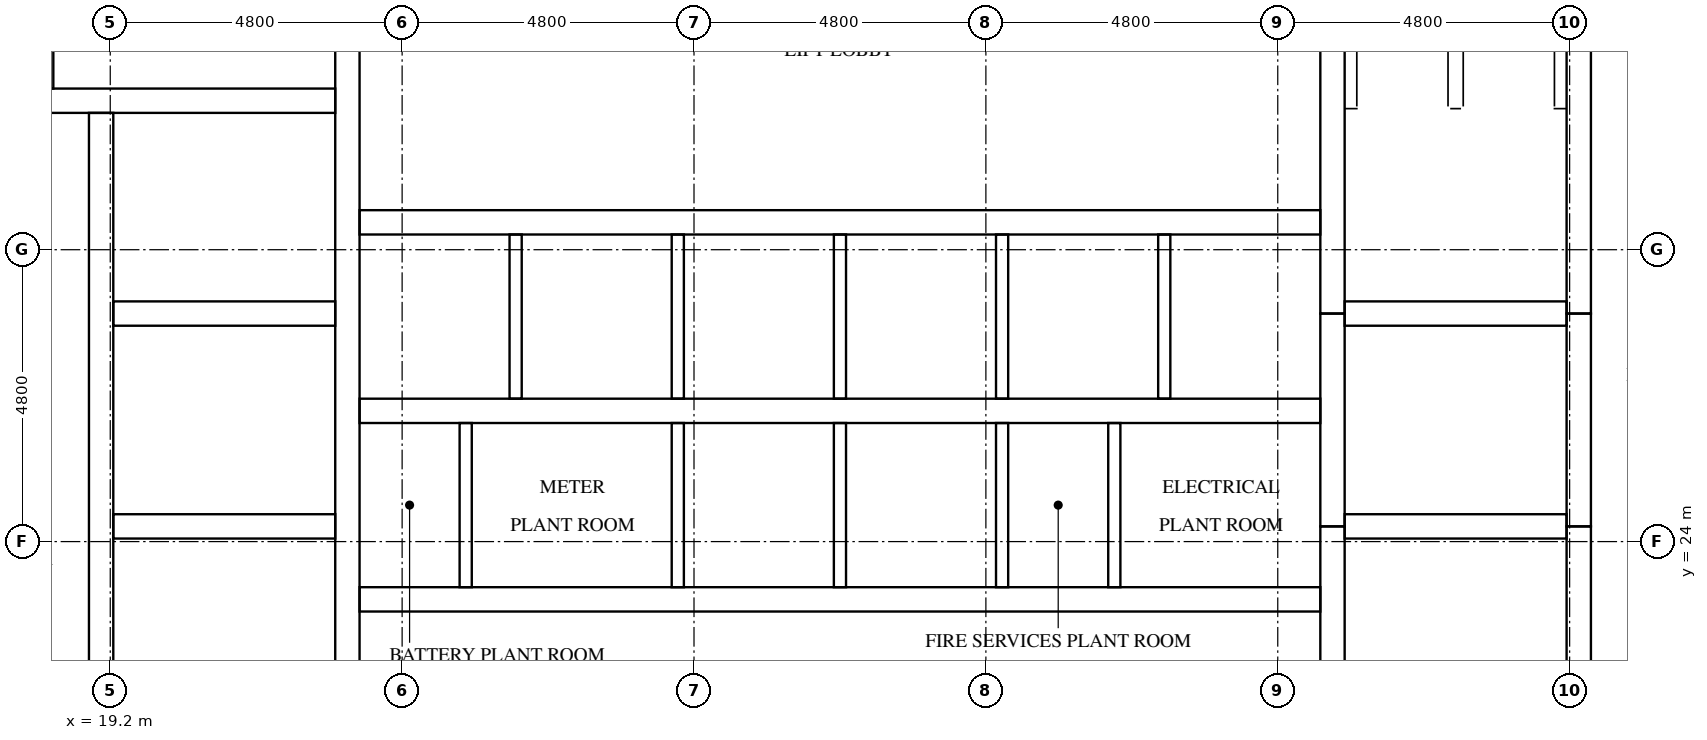
"""IFC4 building model, lengths in metres.
Left out: names, types, materials, properties, quantities, classifications, styles, units other than length and angle.
Written with IfcOpenShell. Run it as: python <this file> out.ifc"""

import sys

from ifc_helpers import new_model, si_unit, direction, frame, frame_2d, origin, place, context, subcontext, project, spatial, rectangle, extrude, element, fill, save


model = new_model("IFC4")
c1 = context("Model", 3, precision=1e-05, world=origin(), true_north=direction((0.0, 1.0)))
c2 = subcontext(c1, "Body", "Model", "MODEL_VIEW")
j1 = project(units=[si_unit("LENGTHUNIT", "METRE"), si_unit("PLANEANGLEUNIT", "RADIAN")], contexts=[c1])
p1 = place(None, origin())
s1 = spatial("IfcSite", under=j1, at=p1, CompositionType="ELEMENT")
p2 = place(p1, origin())
s2 = spatial("IfcBuilding", under=s1, at=p2, CompositionType="ELEMENT")
p3 = place(p2, frame((0.0, 0.0, 291.5)))
s3 = spatial("IfcBuildingStorey", under=s2, at=p3, CompositionType="ELEMENT", Elevation=291.5)
p4 = place(p3, frame((19.05, 15.5, 0.0), z_axis=(0.0, 0.0, 1.0), x_axis=(0.0, 1.0, 0.0)))
e1 = element("IfcWall", 1, at=p4, inside=s3, PredefinedType="SHEAR", context=c2, shape_type="SweptSolid", body=[
    extrude(rectangle(XDim=15.55, YDim=0.4, at=frame_2d((7.775, 0.0))), origin(), (0.0, 0.0, 1.0), 4.4),
])
p5 = place(p4, frame((9.95, 0.0, 0.0)))
e2 = element("IfcOpeningElement", 2, at=p5, cuts=e1, PredefinedType="OPENING", context=c2, shape_type="SweptSolid", body=[
    extrude(rectangle(XDim=1.1, YDim=2.1, at=frame_2d((0.55, 1.05))), frame((0.0, 0.21, 0.0), z_axis=(0.0, -1.0, 0.0), x_axis=(1.0, 0.0, 0.0)), (0.0, 0.0, 1.0), 0.42),
])
p6 = place(p4, frame((13.45, 0.0, 0.0)))
e3 = element("IfcOpeningElement", 3, at=p6, cuts=e1, PredefinedType="OPENING", context=c2, shape_type="SweptSolid", body=[
    extrude(rectangle(XDim=1.1, YDim=2.1, at=frame_2d((0.55, 1.05))), frame((0.0, 0.21, 0.0), z_axis=(0.0, -1.0, 0.0), x_axis=(1.0, 0.0, 0.0)), (0.0, 0.0, 1.0), 0.42),
])
p7 = place(p4, frame((0.7, 0.0, 0.0)))
e4 = element("IfcOpeningElement", 4, at=p7, cuts=e1, PredefinedType="OPENING", context=c2, shape_type="SweptSolid", body=[
    extrude(rectangle(XDim=1.2, YDim=2.1, at=frame_2d((0.6, 1.05))), frame((0.0, 0.21, 0.0), z_axis=(0.0, -1.0, 0.0), x_axis=(1.0, 0.0, 0.0)), (0.0, 0.0, 1.0), 0.42),
])
p8 = place(p3, frame((23.1, 15.5, 0.0), z_axis=(0.0, 0.0, 1.0), x_axis=(0.0, 1.0, 0.0)))
e5 = element("IfcWall", 5, at=p8, inside=s3, PredefinedType="SHEAR", context=c2, shape_type="SweptSolid", body=[
    extrude(rectangle(XDim=21.8, YDim=0.4, at=frame_2d((10.9, 0.0))), origin(), (0.0, 0.0, 1.0), 4.4),
])
p9 = place(p3, frame((39.3, 15.5, 0.0), z_axis=(0.0, 0.0, 1.0), x_axis=(0.0, 1.0, 0.0)))
e6 = element("IfcWall", 6, at=p9, inside=s3, PredefinedType="SHEAR", context=c2, shape_type="SweptSolid", body=[
    extrude(rectangle(XDim=8.75, YDim=0.4, at=frame_2d((4.375, 0.0))), origin(), (0.0, 0.0, 1.0), 4.4),
])
p10 = place(p3, frame((39.3, 24.25, 0.0), z_axis=(0.0, 0.0, 1.0), x_axis=(0.0, 1.0, 0.0)))
e7 = element("IfcWall", 7, at=p10, inside=s3, PredefinedType="SHEAR", context=c2, shape_type="SweptSolid", body=[
    extrude(rectangle(XDim=3.5, YDim=0.4, at=frame_2d((1.75, 0.0))), origin(), (0.0, 0.0, 1.0), 4.4),
])
p11 = place(p3, frame((39.3, 27.75, 0.0), z_axis=(0.0, 0.0, 1.0), x_axis=(0.0, 1.0, 0.0)))
e8 = element("IfcWall", 8, at=p11, inside=s3, PredefinedType="SHEAR", context=c2, shape_type="SweptSolid", body=[
    extrude(rectangle(XDim=9.55, YDim=0.4, at=frame_2d((4.775, 0.0))), origin(), (0.0, 0.0, 1.0), 4.4),
])
p12 = place(p3, frame((43.35, 15.5, 0.0), z_axis=(0.0, 0.0, 1.0), x_axis=(0.0, 1.0, 0.0)))
e9 = element("IfcWall", 9, at=p12, inside=s3, PredefinedType="SHEAR", context=c2, shape_type="SweptSolid", body=[
    extrude(rectangle(XDim=8.75, YDim=0.4, at=frame_2d((4.375, 0.0))), origin(), (0.0, 0.0, 1.0), 4.4),
])
p13 = place(p12, frame((0.7, 0.0, 0.0)))
e10 = element("IfcOpeningElement", 10, at=p13, cuts=e9, PredefinedType="OPENING", context=c2, shape_type="SweptSolid", body=[
    extrude(rectangle(XDim=1.2, YDim=2.1, at=frame_2d((0.6, 1.05))), frame((0.0, 0.21, 0.0), z_axis=(0.0, -1.0, 0.0), x_axis=(1.0, 0.0, 0.0)), (0.0, 0.0, 1.0), 0.42),
])
p14 = place(p3, frame((43.35, 24.25, 0.0), z_axis=(0.0, 0.0, 1.0), x_axis=(0.0, 1.0, 0.0)))
e11 = element("IfcWall", 11, at=p14, inside=s3, PredefinedType="SHEAR", context=c2, shape_type="SweptSolid", body=[
    extrude(rectangle(XDim=3.5, YDim=0.4, at=frame_2d((1.75, 0.0))), origin(), (0.0, 0.0, 1.0), 4.4),
])
p15 = place(p14, frame((1.2, 0.0, 0.0)))
e12 = element("IfcOpeningElement", 12, at=p15, cuts=e11, PredefinedType="OPENING", context=c2, shape_type="SweptSolid", body=[
    extrude(rectangle(XDim=1.1, YDim=2.1, at=frame_2d((0.55, 1.05))), frame((0.0, 0.21, 0.0), z_axis=(0.0, -1.0, 0.0), x_axis=(1.0, 0.0, 0.0)), (0.0, 0.0, 1.0), 0.42),
])
p16 = place(p3, frame((43.35, 27.75, 0.0), z_axis=(0.0, 0.0, 1.0), x_axis=(0.0, 1.0, 0.0)))
e13 = element("IfcWall", 13, at=p16, inside=s3, PredefinedType="SHEAR", context=c2, shape_type="SweptSolid", body=[
    extrude(rectangle(XDim=9.55, YDim=0.4, at=frame_2d((4.775, 0.0))), origin(), (0.0, 0.0, 1.0), 4.4),
])
p17 = place(p16, frame((7.65, 0.0, 0.0)))
e14 = element("IfcOpeningElement", 14, at=p17, cuts=e13, PredefinedType="OPENING", context=c2, shape_type="SweptSolid", body=[
    extrude(rectangle(XDim=1.2, YDim=2.1, at=frame_2d((0.6, 1.05))), frame((0.0, 0.21, 0.0), z_axis=(0.0, -1.0, 0.0), x_axis=(1.0, 0.0, 0.0)), (0.0, 0.0, 1.0), 0.42),
])
for number, where, z_axis, x_axis in (
    (15, (19.25, 24.25, 0.0), (0.0, 0.0, 1.0), (1.0, 0.0, 0.0)),
    (16, (19.25, 27.75, 0.0), (0.0, 0.0, 1.0), (1.0, 0.0, 0.0)),
):
    element("IfcWall", number, at=place(p3, frame(where, z_axis=z_axis, x_axis=x_axis)), inside=s3, PredefinedType="SHEAR", context=c2, shape_type="SweptSolid", body=[
        extrude(rectangle(XDim=3.65, YDim=0.4, at=frame_2d((1.825, 0.0))), origin(), (0.0, 0.0, 1.0), 4.4),
    ])
p18 = place(p3, frame((15.5, 31.25, 0.0), z_axis=(0.0, 0.0, 1.0), x_axis=(1.0, 0.0, 0.0)))
e17 = element("IfcWall", 17, at=p18, inside=s3, PredefinedType="SHEAR", context=c2, shape_type="SweptSolid", body=[
    extrude(rectangle(XDim=7.4, YDim=0.4, at=frame_2d((3.7, 0.0))), origin(), (0.0, 0.0, 1.0), 4.4),
])
for number, where, z_axis, x_axis in (
    (18, (39.5, 24.25, 0.0), (0.0, 0.0, 1.0), (1.0, 0.0, 0.0)),
    (19, (39.5, 27.75, 0.0), (0.0, 0.0, 1.0), (1.0, 0.0, 0.0)),
):
    element("IfcWall", number, at=place(p3, frame(where, z_axis=z_axis, x_axis=x_axis)), inside=s3, PredefinedType="SHEAR", context=c2, shape_type="SweptSolid", body=[
        extrude(rectangle(XDim=3.65, YDim=0.4, at=frame_2d((1.825, 0.0))), origin(), (0.0, 0.0, 1.0), 4.4),
    ])
p19 = place(p3, frame((23.3, 23.05, 0.0), z_axis=(0.0, 0.0, 1.0), x_axis=(1.0, 0.0, 0.0)))
e20 = element("IfcWall", 20, at=p19, inside=s3, PredefinedType="SHEAR", context=c2, shape_type="SweptSolid", body=[
    extrude(rectangle(XDim=15.8, YDim=0.4, at=frame_2d((7.9, 0.0))), origin(), (0.0, 0.0, 1.0), 4.4),
])
p20 = place(p19, frame((6.017, 0.0, 0.0)))
e21 = element("IfcOpeningElement", 21, at=p20, cuts=e20, PredefinedType="OPENING", context=c2, shape_type="SweptSolid", body=[
    extrude(rectangle(XDim=1.1, YDim=2.1, at=frame_2d((0.55, 1.05))), frame((0.0, 0.21, 0.0), z_axis=(0.0, -1.0, 0.0), x_axis=(1.0, 0.0, 0.0)), (0.0, 0.0, 1.0), 0.42),
])
p21 = place(p19, frame((8.683, 0.0, 0.0)))
e22 = element("IfcOpeningElement", 22, at=p21, cuts=e20, PredefinedType="OPENING", context=c2, shape_type="SweptSolid", body=[
    extrude(rectangle(XDim=1.1, YDim=2.1, at=frame_2d((0.55, 1.05))), frame((0.0, 0.21, 0.0), z_axis=(0.0, -1.0, 0.0), x_axis=(1.0, 0.0, 0.0)), (0.0, 0.0, 1.0), 0.42),
])
p22 = place(p19, frame((0.323, 0.0, 0.0)))
e23 = element("IfcOpeningElement", 23, at=p22, cuts=e20, PredefinedType="OPENING", context=c2, shape_type="SweptSolid", body=[
    extrude(rectangle(XDim=1.0, YDim=2.1, at=frame_2d((0.5, 1.05))), frame((0.0, 0.21, 0.0), z_axis=(0.0, -1.0, 0.0), x_axis=(1.0, 0.0, 0.0)), (0.0, 0.0, 1.0), 0.42),
])
p23 = place(p19, frame((2.989, 0.0, 0.0)))
e24 = element("IfcOpeningElement", 24, at=p23, cuts=e20, PredefinedType="OPENING", context=c2, shape_type="SweptSolid", body=[
    extrude(rectangle(XDim=1.0, YDim=2.1, at=frame_2d((0.5, 1.05))), frame((0.0, 0.21, 0.0), z_axis=(0.0, -1.0, 0.0), x_axis=(1.0, 0.0, 0.0)), (0.0, 0.0, 1.0), 0.42),
])
p24 = place(p19, frame((10.989, 0.0, 0.0)))
e25 = element("IfcOpeningElement", 25, at=p24, cuts=e20, PredefinedType="OPENING", context=c2, shape_type="SweptSolid", body=[
    extrude(rectangle(XDim=1.0, YDim=2.1, at=frame_2d((0.5, 1.05))), frame((0.0, 0.21, 0.0), z_axis=(0.0, -1.0, 0.0), x_axis=(1.0, 0.0, 0.0)), (0.0, 0.0, 1.0), 0.42),
])
p25 = place(p19, frame((13.656, 0.0, 0.0)))
e26 = element("IfcOpeningElement", 26, at=p25, cuts=e20, PredefinedType="OPENING", context=c2, shape_type="SweptSolid", body=[
    extrude(rectangle(XDim=1.0, YDim=2.1, at=frame_2d((0.5, 1.05))), frame((0.0, 0.21, 0.0), z_axis=(0.0, -1.0, 0.0), x_axis=(1.0, 0.0, 0.0)), (0.0, 0.0, 1.0), 0.42),
])
p26 = place(p3, frame((23.3, 26.15, 0.0), z_axis=(0.0, 0.0, 1.0), x_axis=(1.0, 0.0, 0.0)))
e27 = element("IfcWall", 27, at=p26, inside=s3, PredefinedType="SHEAR", context=c2, shape_type="SweptSolid", body=[
    extrude(rectangle(XDim=15.8, YDim=0.4, at=frame_2d((7.9, 0.0))), origin(), (0.0, 0.0, 1.0), 4.4),
])
p27 = place(p3, frame((23.3, 29.25, 0.0), z_axis=(0.0, 0.0, 1.0), x_axis=(1.0, 0.0, 0.0)))
e28 = element("IfcWall", 28, at=p27, inside=s3, PredefinedType="SHEAR", context=c2, shape_type="SweptSolid", body=[
    extrude(rectangle(XDim=15.8, YDim=0.4, at=frame_2d((7.9, 0.0))), origin(), (0.0, 0.0, 1.0), 4.4),
])
p28 = place(p27, frame((0.683, 0.0, 0.0)))
e29 = element("IfcOpeningElement", 29, at=p28, cuts=e28, PredefinedType="OPENING", context=c2, shape_type="SweptSolid", body=[
    extrude(rectangle(XDim=1.1, YDim=2.1, at=frame_2d((0.55, 1.05))), frame((0.0, 0.21, 0.0), z_axis=(0.0, -1.0, 0.0), x_axis=(1.0, 0.0, 0.0)), (0.0, 0.0, 1.0), 0.42),
])
p29 = place(p27, frame((3.35, 0.0, 0.0)))
e30 = element("IfcOpeningElement", 30, at=p29, cuts=e28, PredefinedType="OPENING", context=c2, shape_type="SweptSolid", body=[
    extrude(rectangle(XDim=1.1, YDim=2.1, at=frame_2d((0.55, 1.05))), frame((0.0, 0.21, 0.0), z_axis=(0.0, -1.0, 0.0), x_axis=(1.0, 0.0, 0.0)), (0.0, 0.0, 1.0), 0.42),
])
p30 = place(p27, frame((6.017, 0.0, 0.0)))
e31 = element("IfcOpeningElement", 31, at=p30, cuts=e28, PredefinedType="OPENING", context=c2, shape_type="SweptSolid", body=[
    extrude(rectangle(XDim=1.1, YDim=2.1, at=frame_2d((0.55, 1.05))), frame((0.0, 0.21, 0.0), z_axis=(0.0, -1.0, 0.0), x_axis=(1.0, 0.0, 0.0)), (0.0, 0.0, 1.0), 0.42),
])
p31 = place(p27, frame((8.683, 0.0, 0.0)))
e32 = element("IfcOpeningElement", 32, at=p31, cuts=e28, PredefinedType="OPENING", context=c2, shape_type="SweptSolid", body=[
    extrude(rectangle(XDim=1.1, YDim=2.1, at=frame_2d((0.55, 1.05))), frame((0.0, 0.21, 0.0), z_axis=(0.0, -1.0, 0.0), x_axis=(1.0, 0.0, 0.0)), (0.0, 0.0, 1.0), 0.42),
])
p32 = place(p27, frame((11.35, 0.0, 0.0)))
e33 = element("IfcOpeningElement", 33, at=p32, cuts=e28, PredefinedType="OPENING", context=c2, shape_type="SweptSolid", body=[
    extrude(rectangle(XDim=1.1, YDim=2.1, at=frame_2d((0.55, 1.05))), frame((0.0, 0.21, 0.0), z_axis=(0.0, -1.0, 0.0), x_axis=(1.0, 0.0, 0.0)), (0.0, 0.0, 1.0), 0.42),
])
p33 = place(p27, frame((14.017, 0.0, 0.0)))
e34 = element("IfcOpeningElement", 34, at=p33, cuts=e28, PredefinedType="OPENING", context=c2, shape_type="SweptSolid", body=[
    extrude(rectangle(XDim=1.1, YDim=2.1, at=frame_2d((0.55, 1.05))), frame((0.0, 0.21, 0.0), z_axis=(0.0, -1.0, 0.0), x_axis=(1.0, 0.0, 0.0)), (0.0, 0.0, 1.0), 0.42),
])
for number, where, z_axis, x_axis in (
    (35, (25.867, 26.35, 0.0), (0.0, 0.0, 1.0), (0.0, 1.0, 0.0)),
    (36, (28.533, 23.25, 0.0), (0.0, 0.0, 1.0), (0.0, 1.0, 0.0)),
    (37, (28.533, 26.35, 0.0), (0.0, 0.0, 1.0), (0.0, 1.0, 0.0)),
    (38, (31.2, 23.25, 0.0), (0.0, 0.0, 1.0), (0.0, 1.0, 0.0)),
    (39, (31.2, 26.35, 0.0), (0.0, 0.0, 1.0), (0.0, 1.0, 0.0)),
    (40, (33.867, 23.25, 0.0), (0.0, 0.0, 1.0), (0.0, 1.0, 0.0)),
    (41, (33.867, 26.35, 0.0), (0.0, 0.0, 1.0), (0.0, 1.0, 0.0)),
    (42, (36.533, 26.35, 0.0), (0.0, 0.0, 1.0), (0.0, 1.0, 0.0)),
):
    element("IfcWall", number, at=place(p3, frame(where, z_axis=z_axis, x_axis=x_axis)), inside=s3, PredefinedType="SOLIDWALL", context=c2, shape_type="SweptSolid", body=[
        extrude(rectangle(XDim=2.7, YDim=0.2, at=frame_2d((1.35, 0.0))), origin(), (0.0, 0.0, 1.0), 4.4),
    ])
p34 = place(p3, frame((18.164, 31.45, 0.0), z_axis=(0.0, 0.0, 1.0), x_axis=(0.0, 1.0, 0.0)))
e43 = element("IfcWall", 43, at=p34, inside=s3, PredefinedType="PARTITIONING", context=c2, shape_type="SweptSolid", body=[
    extrude(rectangle(XDim=5.85, YDim=0.2, at=frame_2d((2.925, 0.0))), origin(), (0.0, 0.0, 1.0), 4.4),
])
for number, where, z_axis, x_axis in (
    (44, (25.045, 23.25, 0.0), (0.0, 0.0, 1.0), (0.0, 1.0, 0.0)),
    (45, (35.712, 23.25, 0.0), (0.0, 0.0, 1.0), (0.0, 1.0, 0.0)),
):
    element("IfcWall", number, at=place(p3, frame(where, z_axis=z_axis, x_axis=x_axis)), inside=s3, PredefinedType="PARTITIONING", context=c2, shape_type="SweptSolid", body=[
        extrude(rectangle(XDim=2.7, YDim=0.2, at=frame_2d((1.35, 0.0))), origin(), (0.0, 0.0, 1.0), 4.4),
    ])
p35 = place(p28, origin())
e46 = element("IfcDoor", 46, at=p35, inside=s3, OperationType="DOUBLE_DOOR_SLIDING", PredefinedType="DOOR", context=c2, shape_type="SweptSolid", body=[
    extrude(rectangle(XDim=1.1, YDim=2.1, at=frame_2d((0.55, 1.05))), frame((0.0, 0.025, 0.0), z_axis=(0.0, -1.0, 0.0), x_axis=(1.0, 0.0, 0.0)), (0.0, 0.0, 1.0), 0.05),
])
fill(e29, e46)
p36 = place(p29, origin())
e47 = element("IfcDoor", 47, at=p36, inside=s3, OperationType="DOUBLE_DOOR_SLIDING", PredefinedType="DOOR", context=c2, shape_type="SweptSolid", body=[
    extrude(rectangle(XDim=1.1, YDim=2.1, at=frame_2d((0.55, 1.05))), frame((0.0, 0.025, 0.0), z_axis=(0.0, -1.0, 0.0), x_axis=(1.0, 0.0, 0.0)), (0.0, 0.0, 1.0), 0.05),
])
fill(e30, e47)
p37 = place(p30, origin())
e48 = element("IfcDoor", 48, at=p37, inside=s3, OperationType="DOUBLE_DOOR_SLIDING", PredefinedType="DOOR", context=c2, shape_type="SweptSolid", body=[
    extrude(rectangle(XDim=1.1, YDim=2.1, at=frame_2d((0.55, 1.05))), frame((0.0, 0.025, 0.0), z_axis=(0.0, -1.0, 0.0), x_axis=(1.0, 0.0, 0.0)), (0.0, 0.0, 1.0), 0.05),
])
fill(e31, e48)
p38 = place(p31, origin())
e49 = element("IfcDoor", 49, at=p38, inside=s3, OperationType="DOUBLE_DOOR_SLIDING", PredefinedType="DOOR", context=c2, shape_type="SweptSolid", body=[
    extrude(rectangle(XDim=1.1, YDim=2.1, at=frame_2d((0.55, 1.05))), frame((0.0, 0.025, 0.0), z_axis=(0.0, -1.0, 0.0), x_axis=(1.0, 0.0, 0.0)), (0.0, 0.0, 1.0), 0.05),
])
fill(e32, e49)
p39 = place(p32, origin())
e50 = element("IfcDoor", 50, at=p39, inside=s3, OperationType="DOUBLE_DOOR_SLIDING", PredefinedType="DOOR", context=c2, shape_type="SweptSolid", body=[
    extrude(rectangle(XDim=1.1, YDim=2.1, at=frame_2d((0.55, 1.05))), frame((0.0, 0.025, 0.0), z_axis=(0.0, -1.0, 0.0), x_axis=(1.0, 0.0, 0.0)), (0.0, 0.0, 1.0), 0.05),
])
fill(e33, e50)
p40 = place(p33, origin())
e51 = element("IfcDoor", 51, at=p40, inside=s3, OperationType="DOUBLE_DOOR_SLIDING", PredefinedType="DOOR", context=c2, shape_type="SweptSolid", body=[
    extrude(rectangle(XDim=1.1, YDim=2.1, at=frame_2d((0.55, 1.05))), frame((0.0, 0.025, 0.0), z_axis=(0.0, -1.0, 0.0), x_axis=(1.0, 0.0, 0.0)), (0.0, 0.0, 1.0), 0.05),
])
fill(e34, e51)
p41 = place(p20, origin())
e52 = element("IfcDoor", 52, at=p41, inside=s3, OperationType="DOUBLE_DOOR_SLIDING", PredefinedType="DOOR", context=c2, shape_type="SweptSolid", body=[
    extrude(rectangle(XDim=1.1, YDim=2.1, at=frame_2d((0.55, 1.05))), frame((0.0, 0.025, 0.0), z_axis=(0.0, -1.0, 0.0), x_axis=(1.0, 0.0, 0.0)), (0.0, 0.0, 1.0), 0.05),
])
fill(e21, e52)
p42 = place(p21, origin())
e53 = element("IfcDoor", 53, at=p42, inside=s3, OperationType="DOUBLE_DOOR_SLIDING", PredefinedType="DOOR", context=c2, shape_type="SweptSolid", body=[
    extrude(rectangle(XDim=1.1, YDim=2.1, at=frame_2d((0.55, 1.05))), frame((0.0, 0.025, 0.0), z_axis=(0.0, -1.0, 0.0), x_axis=(1.0, 0.0, 0.0)), (0.0, 0.0, 1.0), 0.05),
])
fill(e22, e53)
p43 = place(p5, origin())
e54 = element("IfcDoor", 54, at=p43, inside=s3, OperationType="DOUBLE_DOOR_SLIDING", PredefinedType="DOOR", context=c2, shape_type="SweptSolid", body=[
    extrude(rectangle(XDim=1.1, YDim=2.1, at=frame_2d((0.55, 1.05))), frame((0.0, 0.025, 0.0), z_axis=(0.0, -1.0, 0.0), x_axis=(1.0, 0.0, 0.0)), (0.0, 0.0, 1.0), 0.05),
])
fill(e2, e54)
p44 = place(p6, origin())
e55 = element("IfcDoor", 55, at=p44, inside=s3, OperationType="DOUBLE_DOOR_SLIDING", PredefinedType="DOOR", context=c2, shape_type="SweptSolid", body=[
    extrude(rectangle(XDim=1.1, YDim=2.1, at=frame_2d((0.55, 1.05))), frame((0.0, 0.025, 0.0), z_axis=(0.0, -1.0, 0.0), x_axis=(1.0, 0.0, 0.0)), (0.0, 0.0, 1.0), 0.05),
])
fill(e3, e55)
p45 = place(p15, origin())
e56 = element("IfcDoor", 56, at=p45, inside=s3, OperationType="DOUBLE_DOOR_SLIDING", PredefinedType="DOOR", context=c2, shape_type="SweptSolid", body=[
    extrude(rectangle(XDim=1.1, YDim=2.1, at=frame_2d((0.55, 1.05))), frame((0.0, 0.025, 0.0), z_axis=(0.0, -1.0, 0.0), x_axis=(1.0, 0.0, 0.0)), (0.0, 0.0, 1.0), 0.05),
])
fill(e12, e56)
p46 = place(p22, frame((1.0, 0.0, 0.0), z_axis=(0.0, 0.0, 1.0), x_axis=(-1.0, 0.0, 0.0)))
e57 = element("IfcDoor", 57, at=p46, inside=s3, OperationType="SINGLE_SWING_LEFT", PredefinedType="DOOR", context=c2, shape_type="SweptSolid", body=[
    extrude(rectangle(XDim=1.0, YDim=2.1, at=frame_2d((0.5, 1.05))), frame((0.0, 0.025, 0.0), z_axis=(0.0, -1.0, 0.0), x_axis=(1.0, 0.0, 0.0)), (0.0, 0.0, 1.0), 0.05),
])
fill(e23, e57)
p47 = place(p23, frame((1.0, 0.0, 0.0), z_axis=(0.0, 0.0, 1.0), x_axis=(-1.0, 0.0, 0.0)))
e58 = element("IfcDoor", 58, at=p47, inside=s3, OperationType="SINGLE_SWING_RIGHT", PredefinedType="DOOR", context=c2, shape_type="SweptSolid", body=[
    extrude(rectangle(XDim=1.0, YDim=2.1, at=frame_2d((0.5, 1.05))), frame((0.0, 0.025, 0.0), z_axis=(0.0, -1.0, 0.0), x_axis=(1.0, 0.0, 0.0)), (0.0, 0.0, 1.0), 0.05),
])
fill(e24, e58)
p48 = place(p24, frame((1.0, 0.0, 0.0), z_axis=(0.0, 0.0, 1.0), x_axis=(-1.0, 0.0, 0.0)))
e59 = element("IfcDoor", 59, at=p48, inside=s3, OperationType="SINGLE_SWING_LEFT", PredefinedType="DOOR", context=c2, shape_type="SweptSolid", body=[
    extrude(rectangle(XDim=1.0, YDim=2.1, at=frame_2d((0.5, 1.05))), frame((0.0, 0.025, 0.0), z_axis=(0.0, -1.0, 0.0), x_axis=(1.0, 0.0, 0.0)), (0.0, 0.0, 1.0), 0.05),
])
fill(e25, e59)
p49 = place(p25, frame((1.0, 0.0, 0.0), z_axis=(0.0, 0.0, 1.0), x_axis=(-1.0, 0.0, 0.0)))
e60 = element("IfcDoor", 60, at=p49, inside=s3, OperationType="SINGLE_SWING_RIGHT", PredefinedType="DOOR", context=c2, shape_type="SweptSolid", body=[
    extrude(rectangle(XDim=1.0, YDim=2.1, at=frame_2d((0.5, 1.05))), frame((0.0, 0.025, 0.0), z_axis=(0.0, -1.0, 0.0), x_axis=(1.0, 0.0, 0.0)), (0.0, 0.0, 1.0), 0.05),
])
fill(e26, e60)
save(model, sys.argv[1])
